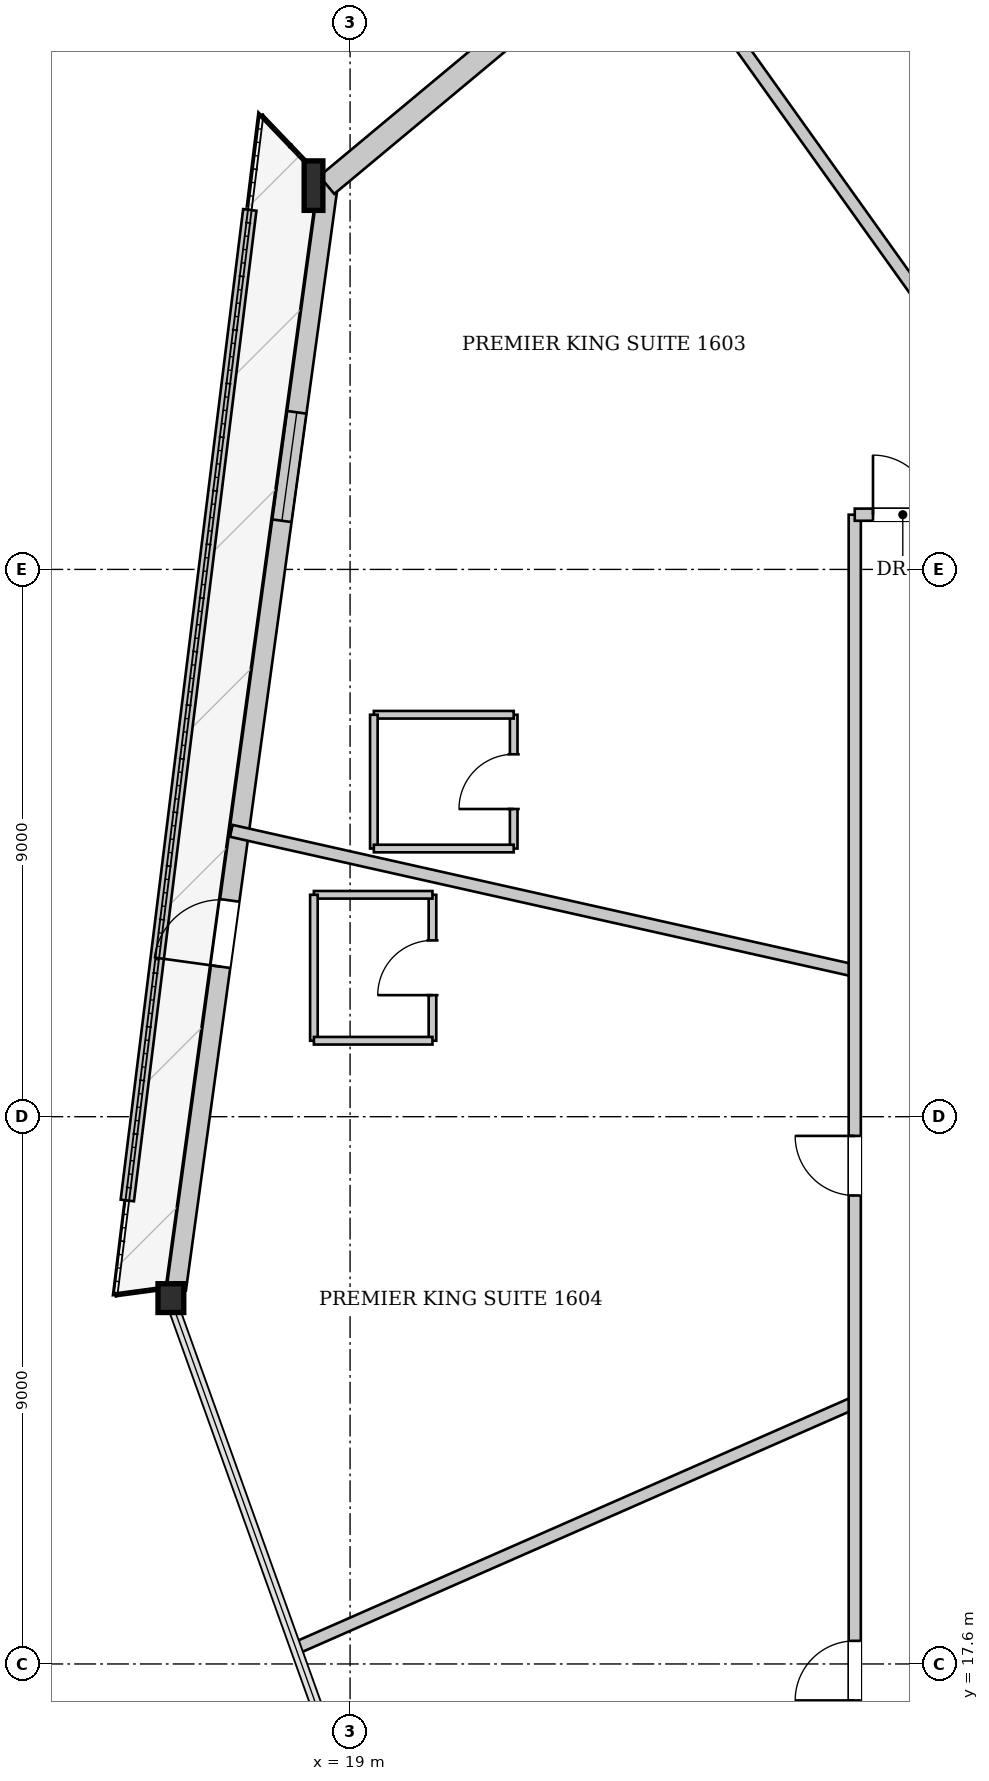
"""IFC4 building model, lengths in metres.
Left out: names, types, materials, properties, quantities, classifications, styles, units other than length and angle.
Written with IfcOpenShell. Run it as: python <this file> out.ifc"""

import sys

from ifc_helpers import new_model, si_unit, direction, frame, frame_2d, origin, origin_2d, place, context, subcontext, project, spatial, rectangle, i_section, extrude, source, transform, mapped, element, fill, save


model = new_model("IFC4")
c1 = context("Model", 3, precision=1e-05, world=origin(), true_north=direction((0.0, 1.0)))
c2 = subcontext(c1, "Body", "Model", "MODEL_VIEW")
j1 = project(units=[si_unit("LENGTHUNIT", "METRE"), si_unit("PLANEANGLEUNIT", "RADIAN")], contexts=[c1])
p1 = place(None, origin())
s1 = spatial("IfcSite", under=j1, at=p1, CompositionType="ELEMENT")
p2 = place(p1, origin())
s2 = spatial("IfcBuilding", under=s1, at=p2, CompositionType="ELEMENT")
p3 = place(p2, frame((0.0, 0.0, 64.8)))
s3 = spatial("IfcBuildingStorey", under=s2, at=p3, CompositionType="ELEMENT", Elevation=64.8)
m1 = source(origin(), c2, "Body", "SweptSolid", [
    extrude(i_section(OverallWidth=0.308, OverallDepth=0.814, WebThickness=0.021, FlangeThickness=0.04, at=origin_2d()), origin(), (0.0, 0.0, 1.0), 3.405),
])
p4 = place(p3, frame((18.497, 42.067, 0.0), z_axis=(-0.057575852548, -0.091562096767, 0.994133493872), x_axis=(0.84654266508, -0.532320877102, 0.0)))
e1 = element("IfcColumn", 1, at=p4, inside=s3, PredefinedType="COLUMN", context=c2, shape_type="MappedRepresentation", body=[
    mapped(m1, transform((0.0, 0.0, 0.0), x_axis=(1.0, 0.0, 0.0), y_axis=(0.0, 1.0, 0.0), z_axis=(0.0, 0.0, 1.0), scale=1.0)),
])
m2 = source(origin(), c2, "Body", "SweptSolid", [
    extrude(i_section(OverallWidth=0.424, OverallDepth=0.474, WebThickness=0.043, FlangeThickness=0.068, at=origin_2d()), origin(), (0.0, 0.0, 1.0), 3.404),
])
p5 = place(p3, frame((15.983, 23.783, 0.0), z_axis=(0.041236988062, -0.097821307332, 0.99434928604), x_axis=(0.921469976901, 0.388449587037, 0.0)))
e2 = element("IfcColumn", 2, at=p5, inside=s3, PredefinedType="COLUMN", context=c2, shape_type="MappedRepresentation", body=[
    mapped(m2, transform((0.0, 0.0, 0.0), x_axis=(1.0, 0.0, 0.0), y_axis=(0.0, 1.0, 0.0), z_axis=(0.0, 0.0, 1.0), scale=1.0)),
])
p6 = place(p3, frame((16.141, 23.761, 0.0), z_axis=(0.0, 0.0, 1.0), x_axis=(0.136198703883, 0.990681539679, 0.0)))
e3 = element("IfcWall", 3, at=p6, inside=s3, PredefinedType="SOLIDWALL", context=c2, shape_type="SweptSolid", body=[
    extrude(rectangle(XDim=18.456, YDim=0.32, at=frame_2d((9.228, 0.0))), origin(), (0.0, 0.0, 1.0), 2.592),
])
p7 = place(p6, frame((5.356, 0.0, 0.0)))
e4 = element("IfcOpeningElement", 4, at=p7, cuts=e3, PredefinedType="OPENING", context=c2, shape_type="SweptSolid", body=[
    extrude(rectangle(XDim=1.1, YDim=2.3, at=frame_2d((0.55, 1.15))), frame((0.0, 0.17, 0.0), z_axis=(0.0, -1.0, 0.0), x_axis=(1.0, 0.0, 0.0)), (0.0, 0.0, 1.0), 0.34),
])
p8 = place(p6, frame((12.758, 0.0, 0.272)))
e5 = element("IfcOpeningElement", 5, at=p8, cuts=e3, PredefinedType="OPENING", context=c2, shape_type="SweptSolid", body=[
    extrude(rectangle(XDim=1.8, YDim=2.2, at=frame_2d((0.9, 1.1))), frame((0.0, 0.17, 0.0), z_axis=(0.0, -1.0, 0.0), x_axis=(1.0, 0.0, 0.0)), (0.0, 0.0, 1.0), 0.34),
])
p9 = place(p3, frame((18.618, 41.921, 0.0), z_axis=(0.0, 0.0, 1.0), x_axis=(0.768273310294, 0.640121957668, 0.0)))
e6 = element("IfcWall", 6, at=p9, inside=s3, PredefinedType="SOLIDWALL", context=c2, shape_type="SweptSolid", body=[
    extrude(rectangle(XDim=6.154, YDim=0.38, at=frame_2d((3.077, 0.0))), origin(), (0.0, 0.0, 1.0), 2.592),
])
p10 = place(p3, frame((17.351, 41.512, 0.0), z_axis=(0.0, 0.0, 1.0), x_axis=(-0.122727522737, -0.992440403834, 0.0)))
e7 = element("IfcWall", 7, at=p10, inside=s3, PredefinedType="PARAPET", context=c2, shape_type="SweptSolid", body=[
    extrude(rectangle(XDim=16.414, YDim=0.22, at=frame_2d((8.207, 0.0))), origin(), (0.0, 0.0, 1.0), 0.3),
])
p11 = place(p3, frame((30.929, 36.5, 0.0), z_axis=(0.0, 0.0, 1.0), x_axis=(-0.581222159054, 0.8137449243, 0.0)))
e8 = element("IfcWall", 8, at=p11, inside=s3, PredefinedType="PARTITIONING", context=c2, shape_type="SweptSolid", body=[
    extrude(rectangle(XDim=11.522, YDim=0.2, at=frame_2d((5.761, 0.0))), origin(), (0.0, 0.0, 1.0), 3.3),
])
p12 = place(p3, frame((27.3, 29.0, 0.0), z_axis=(0.0, 0.0, 1.0), x_axis=(-0.975741680271, 0.218925040554, 0.0)))
e9 = element("IfcWall", 9, at=p12, inside=s3, PredefinedType="PARTITIONING", context=c2, shape_type="SweptSolid", body=[
    extrude(rectangle(XDim=10.508, YDim=0.2, at=frame_2d((5.254, 0.0))), origin(), (0.0, 0.0, 1.0), 3.3),
])
p13 = place(p3, frame((27.3, 21.899, 0.0), z_axis=(0.0, 0.0, 1.0), x_axis=(-0.915540001972, -0.402226931955, 0.0)))
e10 = element("IfcWall", 10, at=p13, inside=s3, PredefinedType="PARTITIONING", context=c2, shape_type="SweptSolid", body=[
    extrude(rectangle(XDim=10.011, YDim=0.2, at=frame_2d((5.005, 0.0))), origin(), (0.0, 0.0, 1.0), 3.3),
])
p14 = place(p3, frame((21.691, 31.01, 0.0), z_axis=(0.0, 0.0, 1.0), x_axis=(0.0, 1.0, 0.0)))
e11 = element("IfcWall", 11, at=p14, inside=s3, PredefinedType="PARTITIONING", context=c2, shape_type="SweptSolid", body=[
    extrude(rectangle(XDim=2.2, YDim=0.125, at=frame_2d((1.1, 0.0))), origin(), (0.0, 0.0, 1.0), 3.3),
])
p15 = place(p14, frame((0.65, 0.0, 0.0)))
e12 = element("IfcOpeningElement", 12, at=p15, cuts=e11, PredefinedType="OPENING", context=c2, shape_type="SweptSolid", body=[
    extrude(rectangle(XDim=0.9, YDim=2.1, at=frame_2d((0.45, 1.05))), frame((0.0, 0.073, 0.0), z_axis=(0.0, -1.0, 0.0), x_axis=(1.0, 0.0, 0.0)), (0.0, 0.0, 1.0), 0.145),
])
p16 = place(p3, frame((21.691, 33.21, 0.0), z_axis=(0.0, 0.0, 1.0), x_axis=(-1.0, 0.0, 0.0)))
e13 = element("IfcWall", 13, at=p16, inside=s3, PredefinedType="PARTITIONING", context=c2, shape_type="SweptSolid", body=[
    extrude(rectangle(XDim=2.3, YDim=0.125, at=frame_2d((1.15, 0.0))), origin(), (0.0, 0.0, 1.0), 3.3),
])
p17 = place(p3, frame((19.391, 33.21, 0.0), z_axis=(0.0, 0.0, 1.0), x_axis=(0.0, -1.0, 0.0)))
e14 = element("IfcWall", 14, at=p17, inside=s3, PredefinedType="PARTITIONING", context=c2, shape_type="SweptSolid", body=[
    extrude(rectangle(XDim=2.2, YDim=0.125, at=frame_2d((1.1, 0.0))), origin(), (0.0, 0.0, 1.0), 3.3),
])
p18 = place(p3, frame((19.391, 31.01, 0.0), z_axis=(0.0, 0.0, 1.0), x_axis=(1.0, 0.0, 0.0)))
e15 = element("IfcWall", 15, at=p18, inside=s3, PredefinedType="PARTITIONING", context=c2, shape_type="SweptSolid", body=[
    extrude(rectangle(XDim=2.3, YDim=0.125, at=frame_2d((1.15, 0.0))), origin(), (0.0, 0.0, 1.0), 3.3),
])
p19 = place(p3, frame((20.355, 27.849, 0.0), z_axis=(0.0, 0.0, 1.0), x_axis=(0.0, 1.0, 0.0)))
e16 = element("IfcWall", 16, at=p19, inside=s3, PredefinedType="PARTITIONING", context=c2, shape_type="SweptSolid", body=[
    extrude(rectangle(XDim=2.4, YDim=0.125, at=frame_2d((1.2, 0.0))), origin(), (0.0, 0.0, 1.0), 3.3),
])
p20 = place(p19, frame((0.75, 0.0, 0.0)))
e17 = element("IfcOpeningElement", 17, at=p20, cuts=e16, PredefinedType="OPENING", context=c2, shape_type="SweptSolid", body=[
    extrude(rectangle(XDim=0.9, YDim=2.1, at=frame_2d((0.45, 1.05))), frame((0.0, 0.073, 0.0), z_axis=(0.0, -1.0, 0.0), x_axis=(1.0, 0.0, 0.0)), (0.0, 0.0, 1.0), 0.145),
])
p21 = place(p3, frame((20.355, 30.249, 0.0), z_axis=(0.0, 0.0, 1.0), x_axis=(-1.0, 0.0, 0.0)))
e18 = element("IfcWall", 18, at=p21, inside=s3, PredefinedType="PARTITIONING", context=c2, shape_type="SweptSolid", body=[
    extrude(rectangle(XDim=1.95, YDim=0.125, at=frame_2d((0.975, 0.0))), origin(), (0.0, 0.0, 1.0), 3.3),
])
p22 = place(p3, frame((18.405, 30.249, 0.0), z_axis=(0.0, 0.0, 1.0), x_axis=(0.0, -1.0, 0.0)))
e19 = element("IfcWall", 19, at=p22, inside=s3, PredefinedType="PARTITIONING", context=c2, shape_type="SweptSolid", body=[
    extrude(rectangle(XDim=2.4, YDim=0.125, at=frame_2d((1.2, 0.0))), origin(), (0.0, 0.0, 1.0), 3.3),
])
p23 = place(p3, frame((18.405, 27.849, 0.0), z_axis=(0.0, 0.0, 1.0), x_axis=(1.0, 0.0, 0.0)))
e20 = element("IfcWall", 20, at=p23, inside=s3, PredefinedType="PARTITIONING", context=c2, shape_type="SweptSolid", body=[
    extrude(rectangle(XDim=1.95, YDim=0.125, at=frame_2d((0.975, 0.0))), origin(), (0.0, 0.0, 1.0), 3.3),
])
p24 = place(p3, frame((27.3, 16.7, 0.0), z_axis=(0.0, 0.0, 1.0), x_axis=(0.0, 1.0, 0.0)))
e21 = element("IfcWall", 21, at=p24, inside=s3, PredefinedType="PARTITIONING", context=c2, shape_type="SweptSolid", body=[
    extrude(rectangle(XDim=19.8, YDim=0.2, at=frame_2d((9.9, 0.0))), origin(), (0.0, 0.0, 1.0), 3.3),
])
p25 = place(p24, frame((8.604, 0.0, 0.0)))
e22 = element("IfcOpeningElement", 22, at=p25, cuts=e21, PredefinedType="OPENING", context=c2, shape_type="SweptSolid", body=[
    extrude(rectangle(XDim=0.98, YDim=2.15, at=frame_2d((0.49, 1.075))), frame((0.0, 0.11, 0.0), z_axis=(0.0, -1.0, 0.0), x_axis=(1.0, 0.0, 0.0)), (0.0, 0.0, 1.0), 0.22),
])
p26 = place(p24, frame((0.3, 0.0, 0.0)))
e23 = element("IfcOpeningElement", 23, at=p26, cuts=e21, PredefinedType="OPENING", context=c2, shape_type="SweptSolid", body=[
    extrude(rectangle(XDim=0.98, YDim=2.15, at=frame_2d((0.49, 1.075))), frame((0.0, 0.11, 0.0), z_axis=(0.0, -1.0, 0.0), x_axis=(1.0, 0.0, 0.0)), (0.0, 0.0, 1.0), 0.22),
])
p27 = place(p3, frame((27.3, 36.5, 0.0), z_axis=(0.0, 0.0, 1.0), x_axis=(1.0, 0.0, 0.0)))
e24 = element("IfcWall", 24, at=p27, inside=s3, PredefinedType="PARTITIONING", context=c2, shape_type="SweptSolid", body=[
    extrude(rectangle(XDim=21.4, YDim=0.2, at=frame_2d((10.7, 0.0))), origin(), (0.0, 0.0, 1.0), 3.3),
])
p28 = place(p27, frame((19.202, 0.0, 0.0)))
e25 = element("IfcOpeningElement", 25, at=p28, cuts=e24, PredefinedType="OPENING", context=c2, shape_type="SweptSolid", body=[
    extrude(rectangle(XDim=0.98, YDim=2.15, at=frame_2d((0.49, 1.075))), frame((0.0, 0.11, 0.0), z_axis=(0.0, -1.0, 0.0), x_axis=(1.0, 0.0, 0.0)), (0.0, 0.0, 1.0), 0.22),
])
p29 = place(p27, frame((7.435, 0.0, 0.0)))
e26 = element("IfcOpeningElement", 26, at=p29, cuts=e24, PredefinedType="OPENING", context=c2, shape_type="SweptSolid", body=[
    extrude(rectangle(XDim=0.98, YDim=2.15, at=frame_2d((0.49, 1.075))), frame((0.0, 0.11, 0.0), z_axis=(0.0, -1.0, 0.0), x_axis=(1.0, 0.0, 0.0)), (0.0, 0.0, 1.0), 0.22),
])
p30 = place(p27, frame((0.3, 0.0, 0.0)))
e27 = element("IfcOpeningElement", 27, at=p30, cuts=e24, PredefinedType="OPENING", context=c2, shape_type="SweptSolid", body=[
    extrude(rectangle(XDim=0.98, YDim=2.15, at=frame_2d((0.49, 1.075))), frame((0.0, 0.11, 0.0), z_axis=(0.0, -1.0, 0.0), x_axis=(1.0, 0.0, 0.0)), (0.0, 0.0, 1.0), 0.22),
])
m3 = source(origin(), c2, "Body", "SweptSolid", [
    extrude(rectangle(XDim=1.1, YDim=2.3, at=frame_2d((0.55, 1.15))), frame((0.0, 0.025, 0.0), z_axis=(0.0, -1.0, 0.0), x_axis=(1.0, 0.0, 0.0)), (0.0, 0.0, 1.0), 0.05),
])
p31 = place(p7, origin())
e28 = element("IfcDoor", 28, at=p31, inside=s3, OperationType="SINGLE_SWING_LEFT", PredefinedType="DOOR", context=c2, shape_type="MappedRepresentation", body=[
    mapped(m3, transform((0.0, 0.0, 0.0), x_axis=(1.0, 0.0, 0.0), y_axis=(0.0, 1.0, 0.0), z_axis=(0.0, 0.0, 1.0), scale=1.0)),
])
fill(e4, e28)
m4 = source(origin(), c2, "Body", "SweptSolid", [
    extrude(rectangle(XDim=1.8, YDim=2.2, at=frame_2d((0.9, 1.1))), frame((0.0, 0.03, 0.0), z_axis=(0.0, -1.0, 0.0), x_axis=(1.0, 0.0, 0.0)), (0.0, 0.0, 1.0), 0.06),
])
p32 = place(p8, origin())
e29 = element("IfcWindow", 29, at=p32, inside=s3, PartitioningType="SINGLE_PANEL", PredefinedType="WINDOW", context=c2, shape_type="MappedRepresentation", body=[
    mapped(m4, transform((0.0, 0.0, 0.0), x_axis=(1.0, 0.0, 0.0), y_axis=(0.0, 1.0, 0.0), z_axis=(0.0, 0.0, 1.0), scale=1.0)),
])
fill(e5, e29)
m5 = source(origin(), c2, "Body", "SweptSolid", [
    extrude(rectangle(XDim=0.9, YDim=2.1, at=frame_2d((0.45, 1.05))), frame((0.0, 0.025, 0.0), z_axis=(0.0, -1.0, 0.0), x_axis=(1.0, 0.0, 0.0)), (0.0, 0.0, 1.0), 0.05),
])
p33 = place(p15, origin())
e30 = element("IfcDoor", 30, at=p33, inside=s3, OperationType="SINGLE_SWING_LEFT", PredefinedType="DOOR", context=c2, shape_type="MappedRepresentation", body=[
    mapped(m5, transform((0.0, 0.0, 0.0), x_axis=(1.0, 0.0, 0.0), y_axis=(0.0, 1.0, 0.0), z_axis=(0.0, 0.0, 1.0), scale=1.0)),
])
fill(e12, e30)
p34 = place(p20, origin())
e31 = element("IfcDoor", 31, at=p34, inside=s3, OperationType="SINGLE_SWING_LEFT", PredefinedType="DOOR", context=c2, shape_type="MappedRepresentation", body=[
    mapped(m5, transform((0.0, 0.0, 0.0), x_axis=(1.0, 0.0, 0.0), y_axis=(0.0, 1.0, 0.0), z_axis=(0.0, 0.0, 1.0), scale=1.0)),
])
fill(e17, e31)
m6 = source(origin(), c2, "Body", "SweptSolid", [
    extrude(rectangle(XDim=0.98, YDim=2.15, at=frame_2d((0.49, 1.075))), frame((0.0, 0.025, 0.0), z_axis=(0.0, -1.0, 0.0), x_axis=(1.0, 0.0, 0.0)), (0.0, 0.0, 1.0), 0.05),
])
p35 = place(p25, origin())
e32 = element("IfcDoor", 32, at=p35, inside=s3, OperationType="SINGLE_SWING_RIGHT", PredefinedType="DOOR", context=c2, shape_type="MappedRepresentation", body=[
    mapped(m6, transform((0.0, 0.0, 0.0), x_axis=(1.0, 0.0, 0.0), y_axis=(0.0, 1.0, 0.0), z_axis=(0.0, 0.0, 1.0), scale=1.0)),
])
fill(e22, e32)
p36 = place(p26, origin())
e33 = element("IfcDoor", 33, at=p36, inside=s3, OperationType="SINGLE_SWING_LEFT", PredefinedType="DOOR", context=c2, shape_type="MappedRepresentation", body=[
    mapped(m6, transform((0.0, 0.0, 0.0), x_axis=(1.0, 0.0, 0.0), y_axis=(0.0, 1.0, 0.0), z_axis=(0.0, 0.0, 1.0), scale=1.0)),
])
fill(e23, e33)
p37 = place(p30, origin())
e34 = element("IfcDoor", 34, at=p37, inside=s3, OperationType="SINGLE_SWING_LEFT", PredefinedType="DOOR", context=c2, shape_type="MappedRepresentation", body=[
    mapped(m6, transform((0.0, 0.0, 0.0), x_axis=(1.0, 0.0, 0.0), y_axis=(0.0, 1.0, 0.0), z_axis=(0.0, 0.0, 1.0), scale=1.0)),
])
fill(e27, e34)
save(model, sys.argv[1])
